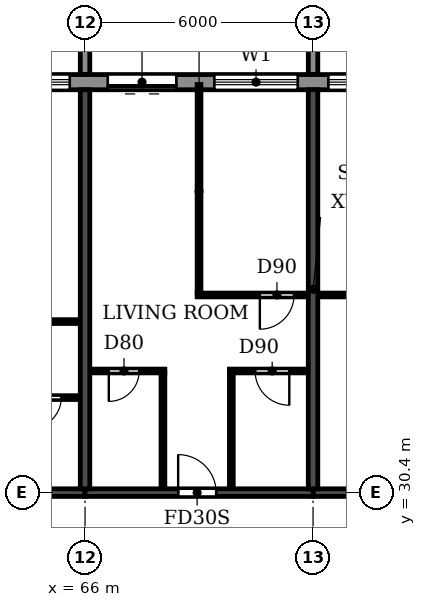
"""IFC4 building model, lengths in metres.
Left out: names, types, materials, properties, quantities, classifications, styles, units other than length and angle.
Written with IfcOpenShell. Run it as: python <this file> out.ifc"""

import sys

from ifc_helpers import new_model, si_unit, direction, frame, frame_2d, origin, place, context, subcontext, project, spatial, polyline, rectangle, outline, extrude, source, transform, mapped, element, fill, save


model = new_model("IFC4")
c1 = context("Model", 3, precision=1e-05, world=origin(), true_north=direction((0.0, 1.0)))
c2 = subcontext(c1, "Body", "Model", "MODEL_VIEW")
j1 = project(units=[si_unit("LENGTHUNIT", "METRE"), si_unit("PLANEANGLEUNIT", "RADIAN")], contexts=[c1])
p1 = place(None, origin())
s1 = spatial("IfcSite", under=j1, at=p1, CompositionType="ELEMENT")
p2 = place(p1, origin())
s2 = spatial("IfcBuilding", under=s1, at=p2, CompositionType="ELEMENT")
p3 = place(p2, frame((0.0, 0.0, 181.8)))
s3 = spatial("IfcBuildingStorey", under=s2, at=p3, CompositionType="ELEMENT", Elevation=181.8)
for number, where, z_axis, x_axis in (
    (1, (66.0, 30.5, 0.0), (0.0, 0.0, 1.0), (0.0, 1.0, 0.0)),
    (2, (72.0, 30.5, 0.0), (0.0, 0.0, 1.0), (0.0, 1.0, 0.0)),
):
    element("IfcWall", number, at=place(p3, frame(where, z_axis=z_axis, x_axis=x_axis)), inside=s3, PredefinedType="SHEAR", context=c2, shape_type="SweptSolid", body=[
        extrude(rectangle(XDim=10.5, YDim=0.25, at=frame_2d((5.25, 0.0))), origin(), (0.0, 0.0, 1.0), 3.08),
    ])
p4 = place(p3, frame((60.0, 30.4, 0.0), z_axis=(0.0, 0.0, 1.0), x_axis=(1.0, 0.0, 0.0)))
e3 = element("IfcWall", 3, at=p4, inside=s3, PredefinedType="SHEAR", context=c2, shape_type="SweptSolid", body=[
    extrude(rectangle(XDim=6.0, YDim=0.2, at=frame_2d((3.0, 0.0))), origin(), (0.0, 0.0, 1.0), 2.48),
])
p5 = place(p4, frame((2.55, 0.0, 0.0)))
e4 = element("IfcOpeningElement", 4, at=p5, cuts=e3, PredefinedType="OPENING", context=c2, shape_type="SweptSolid", body=[
    extrude(rectangle(XDim=1.0, YDim=2.1, at=frame_2d((0.5, 1.05))), frame((0.0, 0.11, 0.0), z_axis=(0.0, -1.0, 0.0), x_axis=(1.0, 0.0, 0.0)), (0.0, 0.0, 1.0), 0.22),
])
p6 = place(p3, frame((66.0, 30.4, 0.0), z_axis=(0.0, 0.0, 1.0), x_axis=(1.0, 0.0, 0.0)))
e5 = element("IfcWall", 5, at=p6, inside=s3, PredefinedType="SHEAR", context=c2, shape_type="SweptSolid", body=[
    extrude(rectangle(XDim=6.0, YDim=0.2, at=frame_2d((3.0, 0.0))), origin(), (0.0, 0.0, 1.0), 2.48),
])
p7 = place(p6, frame((2.45, 0.0, 0.0)))
e6 = element("IfcOpeningElement", 6, at=p7, cuts=e5, PredefinedType="OPENING", context=c2, shape_type="SweptSolid", body=[
    extrude(rectangle(XDim=1.0, YDim=2.1, at=frame_2d((0.5, 1.05))), frame((0.0, 0.11, 0.0), z_axis=(0.0, -1.0, 0.0), x_axis=(1.0, 0.0, 0.0)), (0.0, 0.0, 1.0), 0.22),
])
p8 = place(p3, frame((72.0, 30.4, 0.0), z_axis=(0.0, 0.0, 1.0), x_axis=(1.0, 0.0, 0.0)))
e7 = element("IfcWall", 7, at=p8, inside=s3, PredefinedType="SHEAR", context=c2, shape_type="SweptSolid", body=[
    extrude(rectangle(XDim=6.0, YDim=0.2, at=frame_2d((3.0, 0.0))), origin(), (0.0, 0.0, 1.0), 2.48),
])
p9 = place(p8, frame((2.55, 0.0, 0.0)))
e8 = element("IfcOpeningElement", 8, at=p9, cuts=e7, PredefinedType="OPENING", context=c2, shape_type="SweptSolid", body=[
    extrude(rectangle(XDim=1.0, YDim=2.1, at=frame_2d((0.5, 1.05))), frame((0.0, 0.11, 0.0), z_axis=(0.0, -1.0, 0.0), x_axis=(1.0, 0.0, 0.0)), (0.0, 0.0, 1.0), 0.22),
])
p10 = place(p3, frame((79.317, 41.2, 0.0), z_axis=(0.0, 0.0, 1.0), x_axis=(-1.0, 0.0, 0.0)))
e9 = element("IfcWall", 9, at=p10, inside=s3, PredefinedType="STANDARD", context=c2, shape_type="SweptSolid", body=[
    extrude(rectangle(XDim=56.634, YDim=0.4, at=frame_2d((28.317, 0.0))), origin(), (0.0, 0.0, 1.0), 3.08),
])
p11 = place(p10, frame((52.917, 0.0, 0.0)))
e10 = element("IfcOpeningElement", 10, at=p11, cuts=e9, PredefinedType="OPENING", context=c2, shape_type="SweptSolid", body=[
    extrude(rectangle(XDim=1.8, YDim=2.4, at=frame_2d((0.9, 1.2))), frame((0.0, 0.21, 0.0), z_axis=(0.0, -1.0, 0.0), x_axis=(1.0, 0.0, 0.0)), (0.0, 0.0, 1.0), 0.42),
])
p12 = place(p10, frame((49.717, 0.0, 0.9)))
e11 = element("IfcOpeningElement", 11, at=p12, cuts=e9, PredefinedType="OPENING", context=c2, shape_type="SweptSolid", body=[
    extrude(rectangle(XDim=2.2, YDim=1.5, at=frame_2d((1.1, 0.75))), frame((0.0, 0.21, 0.0), z_axis=(0.0, -1.0, 0.0), x_axis=(1.0, 0.0, 0.0)), (0.0, 0.0, 1.0), 0.42),
])
p13 = place(p10, frame((46.717, 0.0, 0.9)))
e12 = element("IfcOpeningElement", 12, at=p13, cuts=e9, PredefinedType="OPENING", context=c2, shape_type="SweptSolid", body=[
    extrude(rectangle(XDim=2.2, YDim=1.5, at=frame_2d((1.1, 0.75))), frame((0.0, 0.21, 0.0), z_axis=(0.0, -1.0, 0.0), x_axis=(1.0, 0.0, 0.0)), (0.0, 0.0, 1.0), 0.42),
])
p14 = place(p10, frame((43.917, 0.0, 0.0)))
e13 = element("IfcOpeningElement", 13, at=p14, cuts=e9, PredefinedType="OPENING", context=c2, shape_type="SweptSolid", body=[
    extrude(rectangle(XDim=1.8, YDim=2.4, at=frame_2d((0.9, 1.2))), frame((0.0, 0.21, 0.0), z_axis=(0.0, -1.0, 0.0), x_axis=(1.0, 0.0, 0.0)), (0.0, 0.0, 1.0), 0.42),
])
p15 = place(p10, frame((40.717, 0.0, 0.9)))
e14 = element("IfcOpeningElement", 14, at=p15, cuts=e9, PredefinedType="OPENING", context=c2, shape_type="SweptSolid", body=[
    extrude(rectangle(XDim=2.2, YDim=1.5, at=frame_2d((1.1, 0.75))), frame((0.0, 0.21, 0.0), z_axis=(0.0, -1.0, 0.0), x_axis=(1.0, 0.0, 0.0)), (0.0, 0.0, 1.0), 0.42),
])
p16 = place(p10, frame((37.717, 0.0, 0.9)))
e15 = element("IfcOpeningElement", 15, at=p16, cuts=e9, PredefinedType="OPENING", context=c2, shape_type="SweptSolid", body=[
    extrude(rectangle(XDim=2.2, YDim=1.5, at=frame_2d((1.1, 0.75))), frame((0.0, 0.21, 0.0), z_axis=(0.0, -1.0, 0.0), x_axis=(1.0, 0.0, 0.0)), (0.0, 0.0, 1.0), 0.42),
])
p17 = place(p10, frame((34.917, 0.0, 0.0)))
e16 = element("IfcOpeningElement", 16, at=p17, cuts=e9, PredefinedType="OPENING", context=c2, shape_type="SweptSolid", body=[
    extrude(rectangle(XDim=1.8, YDim=2.4, at=frame_2d((0.9, 1.2))), frame((0.0, 0.21, 0.0), z_axis=(0.0, -1.0, 0.0), x_axis=(1.0, 0.0, 0.0)), (0.0, 0.0, 1.0), 0.42),
])
p18 = place(p10, frame((31.717, 0.0, 0.9)))
e17 = element("IfcOpeningElement", 17, at=p18, cuts=e9, PredefinedType="OPENING", context=c2, shape_type="SweptSolid", body=[
    extrude(rectangle(XDim=2.2, YDim=1.5, at=frame_2d((1.1, 0.75))), frame((0.0, 0.21, 0.0), z_axis=(0.0, -1.0, 0.0), x_axis=(1.0, 0.0, 0.0)), (0.0, 0.0, 1.0), 0.42),
])
p19 = place(p10, frame((28.717, 0.0, 0.9)))
e18 = element("IfcOpeningElement", 18, at=p19, cuts=e9, PredefinedType="OPENING", context=c2, shape_type="SweptSolid", body=[
    extrude(rectangle(XDim=2.2, YDim=1.5, at=frame_2d((1.1, 0.75))), frame((0.0, 0.21, 0.0), z_axis=(0.0, -1.0, 0.0), x_axis=(1.0, 0.0, 0.0)), (0.0, 0.0, 1.0), 0.42),
])
p20 = place(p10, frame((25.717, 0.0, 0.9)))
e19 = element("IfcOpeningElement", 19, at=p20, cuts=e9, PredefinedType="OPENING", context=c2, shape_type="SweptSolid", body=[
    extrude(rectangle(XDim=2.2, YDim=1.5, at=frame_2d((1.1, 0.75))), frame((0.0, 0.21, 0.0), z_axis=(0.0, -1.0, 0.0), x_axis=(1.0, 0.0, 0.0)), (0.0, 0.0, 1.0), 0.42),
])
p21 = place(p10, frame((22.917, 0.0, 0.0)))
e20 = element("IfcOpeningElement", 20, at=p21, cuts=e9, PredefinedType="OPENING", context=c2, shape_type="SweptSolid", body=[
    extrude(rectangle(XDim=1.8, YDim=2.4, at=frame_2d((0.9, 1.2))), frame((0.0, 0.21, 0.0), z_axis=(0.0, -1.0, 0.0), x_axis=(1.0, 0.0, 0.0)), (0.0, 0.0, 1.0), 0.42),
])
p22 = place(p10, frame((19.717, 0.0, 0.9)))
e21 = element("IfcOpeningElement", 21, at=p22, cuts=e9, PredefinedType="OPENING", context=c2, shape_type="SweptSolid", body=[
    extrude(rectangle(XDim=2.2, YDim=1.5, at=frame_2d((1.1, 0.75))), frame((0.0, 0.21, 0.0), z_axis=(0.0, -1.0, 0.0), x_axis=(1.0, 0.0, 0.0)), (0.0, 0.0, 1.0), 0.42),
])
p23 = place(p10, frame((16.917, 0.0, 0.0)))
e22 = element("IfcOpeningElement", 22, at=p23, cuts=e9, PredefinedType="OPENING", context=c2, shape_type="SweptSolid", body=[
    extrude(rectangle(XDim=1.8, YDim=2.4, at=frame_2d((0.9, 1.2))), frame((0.0, 0.21, 0.0), z_axis=(0.0, -1.0, 0.0), x_axis=(1.0, 0.0, 0.0)), (0.0, 0.0, 1.0), 0.42),
])
p24 = place(p10, frame((13.717, 0.0, 0.9)))
e23 = element("IfcOpeningElement", 23, at=p24, cuts=e9, PredefinedType="OPENING", context=c2, shape_type="SweptSolid", body=[
    extrude(rectangle(XDim=2.2, YDim=1.5, at=frame_2d((1.1, 0.75))), frame((0.0, 0.21, 0.0), z_axis=(0.0, -1.0, 0.0), x_axis=(1.0, 0.0, 0.0)), (0.0, 0.0, 1.0), 0.42),
])
p25 = place(p10, frame((10.917, 0.0, 0.0)))
e24 = element("IfcOpeningElement", 24, at=p25, cuts=e9, PredefinedType="OPENING", context=c2, shape_type="SweptSolid", body=[
    extrude(rectangle(XDim=1.8, YDim=2.4, at=frame_2d((0.9, 1.2))), frame((0.0, 0.21, 0.0), z_axis=(0.0, -1.0, 0.0), x_axis=(1.0, 0.0, 0.0)), (0.0, 0.0, 1.0), 0.42),
])
p26 = place(p10, frame((7.717, 0.0, 0.9)))
e25 = element("IfcOpeningElement", 25, at=p26, cuts=e9, PredefinedType="OPENING", context=c2, shape_type="SweptSolid", body=[
    extrude(rectangle(XDim=2.2, YDim=1.5, at=frame_2d((1.1, 0.75))), frame((0.0, 0.21, 0.0), z_axis=(0.0, -1.0, 0.0), x_axis=(1.0, 0.0, 0.0)), (0.0, 0.0, 1.0), 0.42),
])
p27 = place(p10, frame((4.717, 0.0, 0.9)))
e26 = element("IfcOpeningElement", 26, at=p27, cuts=e9, PredefinedType="OPENING", context=c2, shape_type="SweptSolid", body=[
    extrude(rectangle(XDim=2.2, YDim=1.5, at=frame_2d((1.1, 0.75))), frame((0.0, 0.21, 0.0), z_axis=(0.0, -1.0, 0.0), x_axis=(1.0, 0.0, 0.0)), (0.0, 0.0, 1.0), 0.42),
])
p28 = place(p10, frame((1.917, 0.0, 0.0)))
e27 = element("IfcOpeningElement", 27, at=p28, cuts=e9, PredefinedType="OPENING", context=c2, shape_type="SweptSolid", body=[
    extrude(rectangle(XDim=1.8, YDim=2.4, at=frame_2d((0.9, 1.2))), frame((0.0, 0.21, 0.0), z_axis=(0.0, -1.0, 0.0), x_axis=(1.0, 0.0, 0.0)), (0.0, 0.0, 1.0), 0.42),
])
m1 = source(origin(), c2, "Body", "SweptSolid", [
    extrude(outline(polyline([(0.0, 0.0), (0.25, 0.0), (0.25, 3.1), (0.0, 3.1), (0.0, 0.0)])), origin(), (0.0, 0.0, 1.0), 3.1),
])
for number, where in (
    (28, (65.875, 41.4, 0.0)),
    (29, (71.875, 41.4, 0.0)),
):
    element("IfcWall", number, at=place(p3, frame(where)), inside=s3, PredefinedType="STANDARD", context=c2, shape_type="MappedRepresentation", body=[
        mapped(m1, transform((0.0, 0.0, 0.0))),
    ])
p29 = place(p3, frame((63.9, 32.9, 0.0), z_axis=(0.0, 0.0, 1.0), x_axis=(1.0, 0.0, 0.0)))
e30 = element("IfcWall", 30, at=p29, inside=s3, PredefinedType="PARTITIONING", context=c2, shape_type="SweptSolid", body=[
    extrude(rectangle(XDim=1.965, YDim=0.1, at=frame_2d((0.982, 0.0))), origin(), (0.0, 0.0, 1.0), 3.08),
])
p30 = place(p29, frame((0.675, 0.0, 0.0)))
e31 = element("IfcOpeningElement", 31, at=p30, cuts=e30, PredefinedType="OPENING", context=c2, shape_type="SweptSolid", body=[
    extrude(rectangle(XDim=0.8, YDim=2.1, at=frame_2d((0.4, 1.05))), frame((0.0, 0.06, 0.0), z_axis=(0.0, -1.0, 0.0), x_axis=(1.0, 0.0, 0.0)), (0.0, 0.0, 1.0), 0.12),
])
p31 = place(p3, frame((66.135, 33.6, 0.0), z_axis=(0.0, 0.0, 1.0), x_axis=(1.0, 0.0, 0.0)))
e32 = element("IfcWall", 32, at=p31, inside=s3, PredefinedType="PARTITIONING", context=c2, shape_type="SweptSolid", body=[
    extrude(rectangle(XDim=1.965, YDim=0.1, at=frame_2d((0.982, 0.0))), origin(), (0.0, 0.0, 1.0), 3.08),
])
p32 = place(p31, frame((0.49, 0.0, 0.0)))
e33 = element("IfcOpeningElement", 33, at=p32, cuts=e32, PredefinedType="OPENING", context=c2, shape_type="SweptSolid", body=[
    extrude(rectangle(XDim=0.8, YDim=2.1, at=frame_2d((0.4, 1.05))), frame((0.0, 0.06, 0.0), z_axis=(0.0, -1.0, 0.0), x_axis=(1.0, 0.0, 0.0)), (0.0, 0.0, 1.0), 0.12),
])
p33 = place(p3, frame((69.8, 33.6, 0.0), z_axis=(0.0, 0.0, 1.0), x_axis=(1.0, 0.0, 0.0)))
e34 = element("IfcWall", 34, at=p33, inside=s3, PredefinedType="PARTITIONING", context=c2, shape_type="SweptSolid", body=[
    extrude(rectangle(XDim=2.065, YDim=0.1, at=frame_2d((1.032, 0.0))), origin(), (0.0, 0.0, 1.0), 3.08),
])
p34 = place(p33, frame((0.675, 0.0, 0.0)))
e35 = element("IfcOpeningElement", 35, at=p34, cuts=e34, PredefinedType="OPENING", context=c2, shape_type="SweptSolid", body=[
    extrude(rectangle(XDim=0.9, YDim=2.1, at=frame_2d((0.45, 1.05))), frame((0.0, 0.06, 0.0), z_axis=(0.0, -1.0, 0.0), x_axis=(1.0, 0.0, 0.0)), (0.0, 0.0, 1.0), 0.12),
])
p35 = place(p3, frame((62.95, 34.9, 0.0), z_axis=(0.0, 0.0, 1.0), x_axis=(1.0, 0.0, 0.0)))
e36 = element("IfcWall", 36, at=p35, inside=s3, PredefinedType="PARTITIONING", context=c2, shape_type="SweptSolid", body=[
    extrude(rectangle(XDim=2.915, YDim=0.1, at=frame_2d((1.458, 0.0))), origin(), (0.0, 0.0, 1.0), 3.08),
])
p36 = place(p35, frame((0.55, 0.0, 0.0)))
e37 = element("IfcOpeningElement", 37, at=p36, cuts=e36, PredefinedType="OPENING", context=c2, shape_type="SweptSolid", body=[
    extrude(rectangle(XDim=0.9, YDim=2.1, at=frame_2d((0.45, 1.05))), frame((0.0, 0.06, 0.0), z_axis=(0.0, -1.0, 0.0), x_axis=(1.0, 0.0, 0.0)), (0.0, 0.0, 1.0), 0.12),
])
p37 = place(p3, frame((68.95, 35.6, 0.0), z_axis=(0.0, 0.0, 1.0), x_axis=(1.0, 0.0, 0.0)))
e38 = element("IfcWall", 38, at=p37, inside=s3, PredefinedType="PARTITIONING", context=c2, shape_type="SweptSolid", body=[
    extrude(rectangle(XDim=2.915, YDim=0.1, at=frame_2d((1.458, 0.0))), origin(), (0.0, 0.0, 1.0), 3.08),
])
p38 = place(p37, frame((1.65, 0.0, 0.0)))
e39 = element("IfcOpeningElement", 39, at=p38, cuts=e38, PredefinedType="OPENING", context=c2, shape_type="SweptSolid", body=[
    extrude(rectangle(XDim=0.9, YDim=2.1, at=frame_2d((0.45, 1.05))), frame((0.0, 0.06, 0.0), z_axis=(0.0, -1.0, 0.0), x_axis=(1.0, 0.0, 0.0)), (0.0, 0.0, 1.0), 0.12),
])
p39 = place(p3, frame((72.135, 35.6, 0.0), z_axis=(0.0, 0.0, 1.0), x_axis=(1.0, 0.0, 0.0)))
e40 = element("IfcWall", 40, at=p39, inside=s3, PredefinedType="PARTITIONING", context=c2, shape_type="SweptSolid", body=[
    extrude(rectangle(XDim=2.065, YDim=0.1, at=frame_2d((1.032, 0.0))), origin(), (0.0, 0.0, 1.0), 3.08),
])
p40 = place(p3, frame((68.05, 30.51, 0.0), z_axis=(0.0, 0.0, 1.0), x_axis=(0.0, 1.0, 0.0)))
e41 = element("IfcWall", 41, at=p40, inside=s3, PredefinedType="PARTITIONING", context=c2, shape_type="SweptSolid", body=[
    extrude(rectangle(XDim=3.04, YDim=0.1, at=frame_2d((1.52, 0.0))), origin(), (0.0, 0.0, 1.0), 3.08),
])
p41 = place(p3, frame((69.0, 35.65, 0.0), z_axis=(0.0, 0.0, 1.0), x_axis=(0.0, 1.0, 0.0)))
e42 = element("IfcWall", 42, at=p41, inside=s3, PredefinedType="PARTITIONING", context=c2, shape_type="SweptSolid", body=[
    extrude(rectangle(XDim=5.49, YDim=0.1, at=frame_2d((2.745, 0.0))), origin(), (0.0, 0.0, 1.0), 3.08),
])
p42 = place(p3, frame((69.85, 30.51, 0.0), z_axis=(0.0, 0.0, 1.0), x_axis=(0.0, 1.0, 0.0)))
e43 = element("IfcWall", 43, at=p42, inside=s3, PredefinedType="PARTITIONING", context=c2, shape_type="SweptSolid", body=[
    extrude(rectangle(XDim=3.04, YDim=0.1, at=frame_2d((1.52, 0.0))), origin(), (0.0, 0.0, 1.0), 3.08),
])
p43 = place(p24, origin())
e44 = element("IfcWindow", 44, at=p43, inside=s3, PartitioningType="DOUBLE_PANEL_HORIZONTAL", PredefinedType="WINDOW", context=c2, shape_type="SweptSolid", body=[
    extrude(rectangle(XDim=2.2, YDim=1.5, at=frame_2d((1.1, 0.75))), frame((0.0, 0.03, 0.0), z_axis=(0.0, -1.0, 0.0), x_axis=(1.0, 0.0, 0.0)), (0.0, 0.0, 1.0), 0.06),
])
fill(e23, e44)
p44 = place(p25, origin())
e45 = element("IfcDoor", 45, at=p44, inside=s3, OperationType="DOUBLE_DOOR_SLIDING", PredefinedType="DOOR", context=c2, shape_type="SweptSolid", body=[
    extrude(rectangle(XDim=1.8, YDim=2.4, at=frame_2d((0.9, 1.2))), frame((0.0, 0.025, 0.0), z_axis=(0.0, -1.0, 0.0), x_axis=(1.0, 0.0, 0.0)), (0.0, 0.0, 1.0), 0.05),
])
fill(e24, e45)
p45 = place(p26, origin())
e46 = element("IfcWindow", 46, at=p45, inside=s3, PartitioningType="DOUBLE_PANEL_HORIZONTAL", PredefinedType="WINDOW", context=c2, shape_type="SweptSolid", body=[
    extrude(rectangle(XDim=2.2, YDim=1.5, at=frame_2d((1.1, 0.75))), frame((0.0, 0.03, 0.0), z_axis=(0.0, -1.0, 0.0), x_axis=(1.0, 0.0, 0.0)), (0.0, 0.0, 1.0), 0.06),
])
fill(e25, e46)
p46 = place(p27, origin())
e47 = element("IfcWindow", 47, at=p46, inside=s3, PartitioningType="DOUBLE_PANEL_HORIZONTAL", PredefinedType="WINDOW", context=c2, shape_type="SweptSolid", body=[
    extrude(rectangle(XDim=2.2, YDim=1.5, at=frame_2d((1.1, 0.75))), frame((0.0, 0.03, 0.0), z_axis=(0.0, -1.0, 0.0), x_axis=(1.0, 0.0, 0.0)), (0.0, 0.0, 1.0), 0.06),
])
fill(e26, e47)
p47 = place(p30, frame((0.8, 0.0, 0.0), z_axis=(0.0, 0.0, 1.0), x_axis=(-1.0, 0.0, 0.0)))
e48 = element("IfcDoor", 48, at=p47, inside=s3, OperationType="SINGLE_SWING_RIGHT", PredefinedType="DOOR", context=c2, shape_type="SweptSolid", body=[
    extrude(rectangle(XDim=0.8, YDim=2.1, at=frame_2d((0.4, 1.05))), frame((0.0, 0.025, 0.0), z_axis=(0.0, -1.0, 0.0), x_axis=(1.0, 0.0, 0.0)), (0.0, 0.0, 1.0), 0.05),
])
fill(e31, e48)
p48 = place(p32, frame((0.8, 0.0, 0.0), z_axis=(0.0, 0.0, 1.0), x_axis=(-1.0, 0.0, 0.0)))
e49 = element("IfcDoor", 49, at=p48, inside=s3, OperationType="SINGLE_SWING_RIGHT", PredefinedType="DOOR", context=c2, shape_type="SweptSolid", body=[
    extrude(rectangle(XDim=0.8, YDim=2.1, at=frame_2d((0.4, 1.05))), frame((0.0, 0.025, 0.0), z_axis=(0.0, -1.0, 0.0), x_axis=(1.0, 0.0, 0.0)), (0.0, 0.0, 1.0), 0.05),
])
fill(e33, e49)
p49 = place(p7, origin())
e50 = element("IfcDoor", 50, at=p49, inside=s3, OperationType="SINGLE_SWING_LEFT", PredefinedType="DOOR", context=c2, shape_type="SweptSolid", body=[
    extrude(rectangle(XDim=1.0, YDim=2.1, at=frame_2d((0.5, 1.05))), frame((0.0, 0.025, 0.0), z_axis=(0.0, -1.0, 0.0), x_axis=(1.0, 0.0, 0.0)), (0.0, 0.0, 1.0), 0.05),
])
fill(e6, e50)
p50 = place(p34, frame((0.9, 0.0, 0.0), z_axis=(0.0, 0.0, 1.0), x_axis=(-1.0, 0.0, 0.0)))
e51 = element("IfcDoor", 51, at=p50, inside=s3, OperationType="SINGLE_SWING_LEFT", PredefinedType="DOOR", context=c2, shape_type="SweptSolid", body=[
    extrude(rectangle(XDim=0.9, YDim=2.1, at=frame_2d((0.45, 1.05))), frame((0.0, 0.025, 0.0), z_axis=(0.0, -1.0, 0.0), x_axis=(1.0, 0.0, 0.0)), (0.0, 0.0, 1.0), 0.05),
])
fill(e35, e51)
p51 = place(p38, frame((0.9, 0.0, 0.0), z_axis=(0.0, 0.0, 1.0), x_axis=(-1.0, 0.0, 0.0)))
e52 = element("IfcDoor", 52, at=p51, inside=s3, OperationType="SINGLE_SWING_RIGHT", PredefinedType="DOOR", context=c2, shape_type="SweptSolid", body=[
    extrude(rectangle(XDim=0.9, YDim=2.1, at=frame_2d((0.45, 1.05))), frame((0.0, 0.025, 0.0), z_axis=(0.0, -1.0, 0.0), x_axis=(1.0, 0.0, 0.0)), (0.0, 0.0, 1.0), 0.05),
])
fill(e39, e52)
save(model, sys.argv[1])
